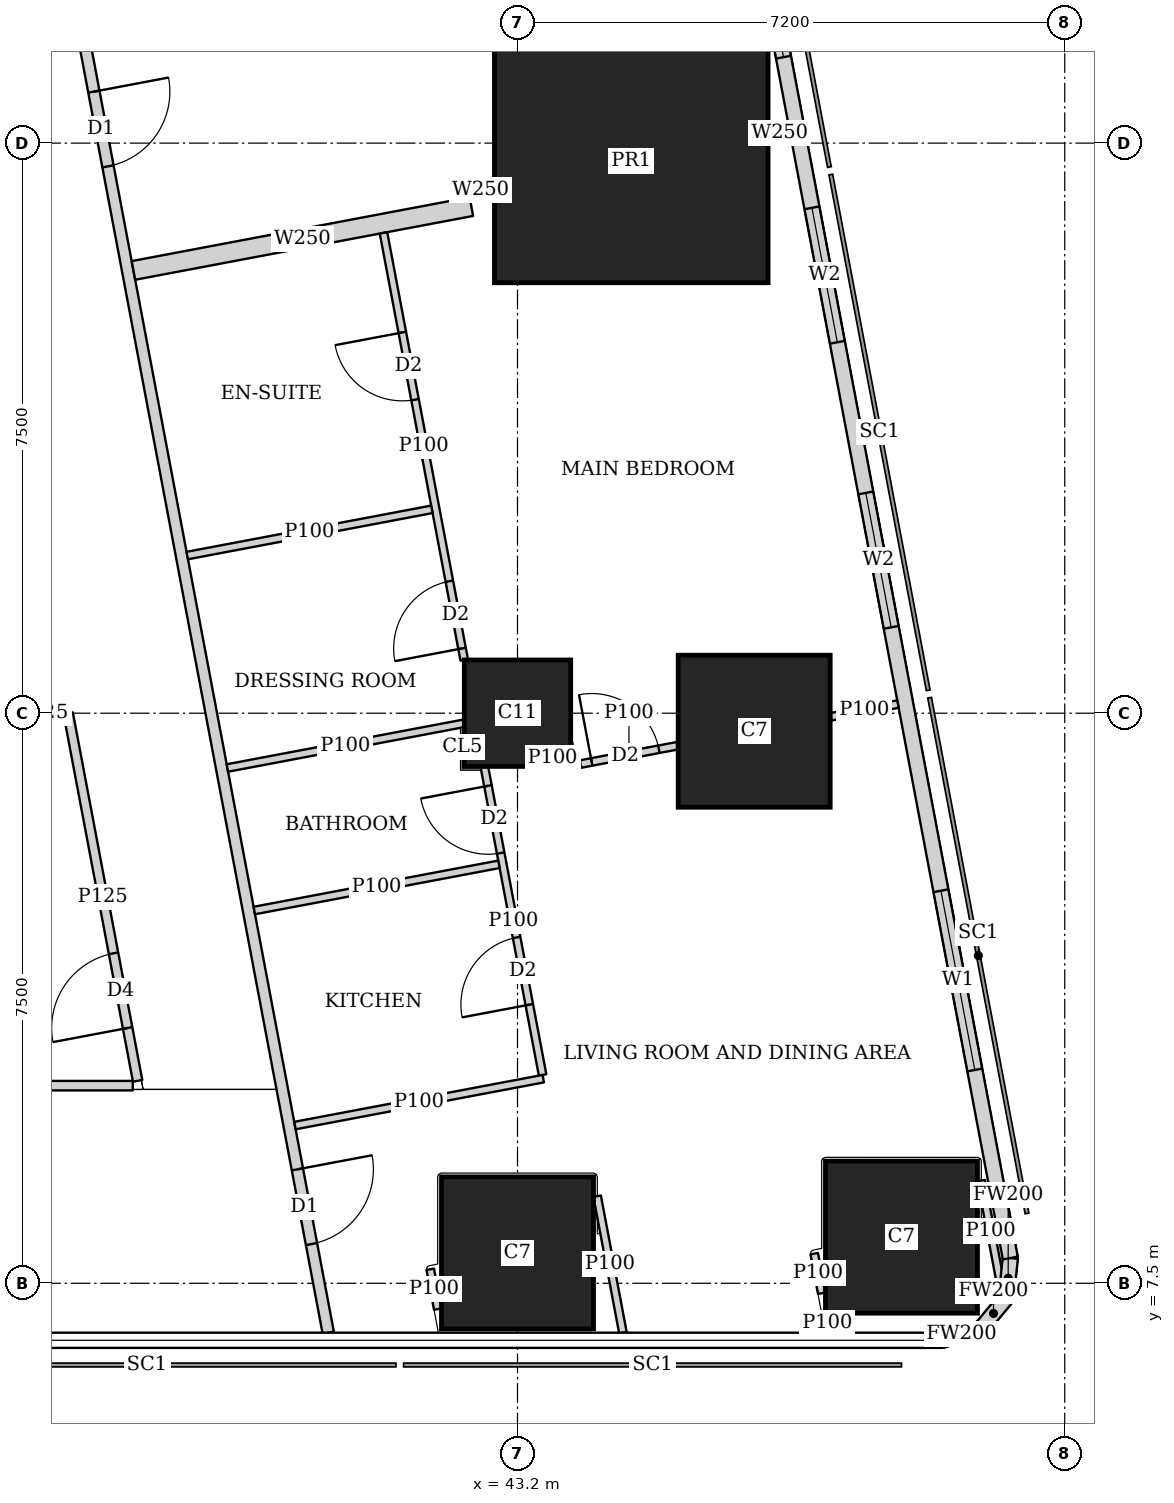
"""IFC4 building model, lengths in metres.
Left out: names, types, materials, properties, quantities, classifications, styles, units other than length and angle.
Written with IfcOpenShell. Run it as: python <this file> out.ifc"""

import sys

from ifc_helpers import new_model, si_unit, direction, frame, frame_2d, origin, origin_2d, place, context, subcontext, project, spatial, rectangle, extrude, element, fill, save


model = new_model("IFC4")
c1 = context("Model", 3, precision=1e-05, world=origin(), true_north=direction((0.0, 1.0)))
c2 = subcontext(c1, "Body", "Model", "MODEL_VIEW")
j1 = project(units=[si_unit("LENGTHUNIT", "METRE"), si_unit("PLANEANGLEUNIT", "RADIAN")], contexts=[c1])
p1 = place(None, origin())
s1 = spatial("IfcSite", under=j1, at=p1, CompositionType="ELEMENT")
p2 = place(p1, origin())
s2 = spatial("IfcBuilding", under=s1, at=p2, CompositionType="ELEMENT")
p3 = place(p2, frame((0.0, 0.0, 289.1)))
s3 = spatial("IfcBuildingStorey", under=s2, at=p3, CompositionType="ELEMENT", Elevation=289.1)
for number, where, z_axis, x_axis in (
    (1, (43.2, 7.9, 0.0), (0.0, 0.0, 1.0), (1.0, 0.0, 0.0)),
    (2, (48.252, 8.107, 0.0), (0.0, 0.0, 1.0), (1.0, 0.0, 0.0)),
):
    element("IfcColumn", number, at=place(p3, frame(where, z_axis=z_axis, x_axis=x_axis)), inside=s3, PredefinedType="COLUMN", context=c2, shape_type="SweptSolid", body=[
        extrude(rectangle(XDim=2.0, YDim=2.0, at=origin_2d()), origin(), (0.0, 0.0, 1.0), 3.75),
    ])
p4 = place(p3, frame((43.2, 15.0, 0.0), z_axis=(0.0, 0.0, 1.0), x_axis=(1.0, 0.0, 0.0)))
e3 = element("IfcColumn", 3, at=p4, inside=s3, PredefinedType="COLUMN", context=c2, shape_type="SweptSolid", body=[
    extrude(rectangle(XDim=1.4, YDim=1.4, at=origin_2d()), origin(), (0.0, 0.0, 1.0), 3.75),
])
p5 = place(p3, frame((46.314, 14.763, 0.0), z_axis=(0.0, 0.0, 1.0), x_axis=(1.0, 0.0, 0.0)))
e4 = element("IfcColumn", 4, at=p5, inside=s3, PredefinedType="COLUMN", context=c2, shape_type="SweptSolid", body=[
    extrude(rectangle(XDim=2.0, YDim=2.0, at=origin_2d()), origin(), (0.0, 0.0, 1.0), 3.75),
])
p6 = place(p3, frame((44.697, 22.263, 0.0), z_axis=(0.0, 0.0, 1.0), x_axis=(1.0, 0.0, 0.0)))
e5 = element("IfcColumn", 5, at=p6, inside=s3, PredefinedType="COLUMN", context=c2, shape_type="SweptSolid", body=[
    extrude(rectangle(XDim=3.6, YDim=3.2, at=origin_2d()), origin(), (0.0, 0.0, 1.0), 3.75),
])
p7 = place(p3, frame((48.787, 6.75, 0.0), z_axis=(0.0, 0.0, 1.0), x_axis=(0.957282247819, 0.289155145225, 0.0)))
e6 = element("IfcWall", 6, at=p7, inside=s3, PredefinedType="SOLIDWALL", context=c2, shape_type="SweptSolid", body=[
    extrude(rectangle(XDim=0.533, YDim=0.2, at=frame_2d((0.266, 0.0))), origin(), (0.0, 0.0, 1.0), 3.5),
])
p8 = place(p3, frame((49.297, 6.904, 0.0), z_axis=(0.0, 0.0, 1.0), x_axis=(0.639255849474, 0.768994121508, 0.0)))
e7 = element("IfcWall", 7, at=p8, inside=s3, PredefinedType="SOLIDWALL", context=c2, shape_type="SweptSolid", body=[
    extrude(rectangle(XDim=0.518, YDim=0.2, at=frame_2d((0.259, 0.0))), origin(), (0.0, 0.0, 1.0), 3.5),
])
p9 = place(p3, frame((49.628, 7.302, 0.0), z_axis=(0.0, 0.0, 1.0), x_axis=(0.105352390132, 0.994434952068, 0.0)))
e8 = element("IfcWall", 8, at=p9, inside=s3, PredefinedType="SOLIDWALL", context=c2, shape_type="SweptSolid", body=[
    extrude(rectangle(XDim=0.533, YDim=0.2, at=frame_2d((0.267, 0.0))), origin(), (0.0, 0.0, 1.0), 3.5),
])
p10 = place(p3, frame((49.684, 7.832, 0.0), z_axis=(0.0, 0.0, 1.0), x_axis=(-0.185616669694, 0.982622232565, 0.0)))
e9 = element("IfcWall", 9, at=p10, inside=s3, PredefinedType="SOLIDWALL", context=c2, shape_type="SweptSolid", body=[
    extrude(rectangle(XDim=36.0, YDim=0.2, at=frame_2d((18.0, 0.0))), origin(), (0.0, 0.0, 1.0), 3.5),
])
p11 = place(p10, frame((2.518, 0.0, 0.9)))
e10 = element("IfcOpeningElement", 10, at=p11, cuts=e9, PredefinedType="OPENING", context=c2, shape_type="SweptSolid", body=[
    extrude(rectangle(XDim=2.4, YDim=1.5, at=frame_2d((1.2, 0.75))), frame((0.0, 0.11, 0.0), z_axis=(0.0, -1.0, 0.0), x_axis=(1.0, 0.0, 0.0)), (0.0, 0.0, 1.0), 0.22),
])
p12 = place(p10, frame((8.444, 0.0, 0.9)))
e11 = element("IfcOpeningElement", 11, at=p12, cuts=e9, PredefinedType="OPENING", context=c2, shape_type="SweptSolid", body=[
    extrude(rectangle(XDim=1.8, YDim=1.5, at=frame_2d((0.9, 0.75))), frame((0.0, 0.11, 0.0), z_axis=(0.0, -1.0, 0.0), x_axis=(1.0, 0.0, 0.0)), (0.0, 0.0, 1.0), 0.22),
])
p13 = place(p10, frame((12.261, 0.0, 0.9)))
e12 = element("IfcOpeningElement", 12, at=p13, cuts=e9, PredefinedType="OPENING", context=c2, shape_type="SweptSolid", body=[
    extrude(rectangle(XDim=1.8, YDim=1.5, at=frame_2d((0.9, 0.75))), frame((0.0, 0.11, 0.0), z_axis=(0.0, -1.0, 0.0), x_axis=(1.0, 0.0, 0.0)), (0.0, 0.0, 1.0), 0.22),
])
p14 = place(p10, frame((16.078, 0.0, 0.9)))
e13 = element("IfcOpeningElement", 13, at=p14, cuts=e9, PredefinedType="OPENING", context=c2, shape_type="SweptSolid", body=[
    extrude(rectangle(XDim=1.8, YDim=1.5, at=frame_2d((0.9, 0.75))), frame((0.0, 0.11, 0.0), z_axis=(0.0, -1.0, 0.0), x_axis=(1.0, 0.0, 0.0)), (0.0, 0.0, 1.0), 0.22),
])
p15 = place(p10, frame((19.894, 0.0, 0.9)))
e14 = element("IfcOpeningElement", 14, at=p15, cuts=e9, PredefinedType="OPENING", context=c2, shape_type="SweptSolid", body=[
    extrude(rectangle(XDim=1.8, YDim=1.5, at=frame_2d((0.9, 0.75))), frame((0.0, 0.11, 0.0), z_axis=(0.0, -1.0, 0.0), x_axis=(1.0, 0.0, 0.0)), (0.0, 0.0, 1.0), 0.22),
])
p16 = place(p10, frame((23.71, 0.0, 0.9)))
e15 = element("IfcOpeningElement", 15, at=p16, cuts=e9, PredefinedType="OPENING", context=c2, shape_type="SweptSolid", body=[
    extrude(rectangle(XDim=1.8, YDim=1.5, at=frame_2d((0.9, 0.75))), frame((0.0, 0.11, 0.0), z_axis=(0.0, -1.0, 0.0), x_axis=(1.0, 0.0, 0.0)), (0.0, 0.0, 1.0), 0.22),
])
p17 = place(p10, frame((27.526, 0.0, 0.9)))
e16 = element("IfcOpeningElement", 16, at=p17, cuts=e9, PredefinedType="OPENING", context=c2, shape_type="SweptSolid", body=[
    extrude(rectangle(XDim=1.8, YDim=1.5, at=frame_2d((0.9, 0.75))), frame((0.0, 0.11, 0.0), z_axis=(0.0, -1.0, 0.0), x_axis=(1.0, 0.0, 0.0)), (0.0, 0.0, 1.0), 0.22),
])
p18 = place(p10, frame((32.046, 0.0, 0.9)))
e17 = element("IfcOpeningElement", 17, at=p18, cuts=e9, PredefinedType="OPENING", context=c2, shape_type="SweptSolid", body=[
    extrude(rectangle(XDim=1.8, YDim=1.5, at=frame_2d((0.9, 0.75))), frame((0.0, 0.11, 0.0), z_axis=(0.0, -1.0, 0.0), x_axis=(1.0, 0.0, 0.0)), (0.0, 0.0, 1.0), 0.22),
])
p19 = place(p3, frame((34.036, 42.186, 0.0), z_axis=(0.0, 0.0, 1.0), x_axis=(0.185593518645, -0.9826266055, 0.0)))
e18 = element("IfcWall", 18, at=p19, inside=s3, PredefinedType="SOLIDWALL", context=c2, shape_type="SweptSolid", body=[
    extrude(rectangle(XDim=35.961, YDim=0.15, at=frame_2d((17.98, 0.0))), origin(), (0.0, 0.0, 1.0), 2.5),
])
p20 = place(p19, frame((19.345, 0.0, 0.0)))
e19 = element("IfcOpeningElement", 19, at=p20, cuts=e18, PredefinedType="OPENING", context=c2, shape_type="SweptSolid", body=[
    extrude(rectangle(XDim=1.0, YDim=2.1, at=frame_2d((0.5, 1.05))), frame((0.0, 0.085, 0.0), z_axis=(0.0, -1.0, 0.0), x_axis=(1.0, 0.0, 0.0)), (0.0, 0.0, 1.0), 0.17),
])
p21 = place(p19, frame((33.774, 0.0, 0.0)))
e20 = element("IfcOpeningElement", 20, at=p21, cuts=e18, PredefinedType="OPENING", context=c2, shape_type="SweptSolid", body=[
    extrude(rectangle(XDim=1.0, YDim=2.1, at=frame_2d((0.5, 1.05))), frame((0.0, 0.085, 0.0), z_axis=(0.0, -1.0, 0.0), x_axis=(1.0, 0.0, 0.0)), (0.0, 0.0, 1.0), 0.17),
])
p22 = place(p3, frame((44.248, 8.646, 0.0), z_axis=(0.0, 0.0, 1.0), x_axis=(0.185417594585, -0.982659816833, 0.0)))
e21 = element("IfcWall", 21, at=p22, inside=s3, PredefinedType="PARTITIONING", context=c2, shape_type="SweptSolid", body=[
    extrude(rectangle(XDim=1.828, YDim=0.1, at=frame_2d((0.914, 0.0))), origin(), (0.0, 0.0, 1.0), 2.05),
])
p23 = place(p3, frame((42.151, 7.16, 0.0), z_axis=(0.0, 0.0, 1.0), x_axis=(-0.185366164644, 0.982669519729, 0.0)))
e22 = element("IfcWall", 22, at=p23, inside=s3, PredefinedType="PARTITIONING", context=c2, shape_type="SweptSolid", body=[
    extrude(rectangle(XDim=0.533, YDim=0.1, at=frame_2d((0.267, 0.0))), origin(), (0.0, 0.0, 1.0), 2.5),
])
p24 = place(p3, frame((49.3, 8.851, 0.0), z_axis=(0.0, 0.0, 1.0), x_axis=(0.18581620423, -0.982584519645, 0.0)))
e23 = element("IfcWall", 23, at=p24, inside=s3, PredefinedType="PARTITIONING", context=c2, shape_type="SweptSolid", body=[
    extrude(rectangle(XDim=1.351, YDim=0.1, at=frame_2d((0.675, 0.0))), origin(), (0.0, 0.0, 1.0), 3.5),
])
p25 = place(p3, frame((47.301, 6.85, 0.0), z_axis=(0.0, 0.0, 1.0), x_axis=(-0.187513903188, 0.982261948826, 0.0)))
e24 = element("IfcWall", 24, at=p25, inside=s3, PredefinedType="PARTITIONING", context=c2, shape_type="SweptSolid", body=[
    extrude(rectangle(XDim=0.251, YDim=0.1, at=frame_2d((0.125, 0.0))), origin(), (0.0, 0.0, 1.0), 3.5),
])
p26 = place(p3, frame((47.203, 7.369, 0.0), z_axis=(0.0, 0.0, 1.0), x_axis=(-0.186456243114, 0.982463266185, 0.0)))
e25 = element("IfcWall", 25, at=p26, inside=s3, PredefinedType="PARTITIONING", context=c2, shape_type="SweptSolid", body=[
    extrude(rectangle(XDim=0.53, YDim=0.1, at=frame_2d((0.265, 0.0))), origin(), (0.0, 0.0, 1.0), 2.05),
])
p27 = place(p3, frame((46.782, 22.657, 0.0), z_axis=(0.0, 0.0, 1.0), x_axis=(-0.982104607121, -0.188336243648, 0.0)))
e26 = element("IfcWall", 26, at=p27, inside=s3, PredefinedType="SOLIDWALL", context=c2, shape_type="SweptSolid", body=[
    extrude(rectangle(XDim=0.266, YDim=0.25, at=frame_2d((0.133, 0.0))), origin(), (0.0, 0.0, 1.0), 3.5),
])
p28 = place(p3, frame((42.873, 21.918, 0.0), z_axis=(0.0, 0.0, 1.0), x_axis=(-0.982431406936, -0.186624035603, 0.0)))
e27 = element("IfcWall", 27, at=p28, inside=s3, PredefinedType="SOLIDWALL", context=c2, shape_type="SweptSolid", body=[
    extrude(rectangle(XDim=0.322, YDim=0.25, at=frame_2d((0.161, 0.0))), origin(), (0.0, 0.0, 1.0), 2.5),
])
p29 = place(p3, frame((42.593, 21.665, 0.0), z_axis=(0.0, 0.0, 1.0), x_axis=(-0.982612837616, -0.185666398014, 0.0)))
e28 = element("IfcWall", 28, at=p29, inside=s3, PredefinedType="SOLIDWALL", context=c2, shape_type="SweptSolid", body=[
    extrude(rectangle(XDim=4.525, YDim=0.25, at=frame_2d((2.262, 0.0))), origin(), (0.0, 0.0, 1.0), 2.5),
])
p30 = place(p3, frame((48.206, 15.12, 0.0), z_axis=(0.0, 0.0, 1.0), x_axis=(-0.982497680814, -0.186274816318, 0.0)))
e29 = element("IfcWall", 29, at=p30, inside=s3, PredefinedType="PARTITIONING", context=c2, shape_type="SweptSolid", body=[
    extrude(rectangle(XDim=0.898, YDim=0.1, at=frame_2d((0.449, 0.0))), origin(), (0.0, 0.0, 1.0), 3.5),
])
p31 = place(p3, frame((45.304, 14.572, 0.0), z_axis=(0.0, 0.0, 1.0), x_axis=(-0.982602741717, -0.185719821156, 0.0)))
e30 = element("IfcWall", 30, at=p31, inside=s3, PredefinedType="PARTITIONING", context=c2, shape_type="SweptSolid", body=[
    extrude(rectangle(XDim=1.297, YDim=0.1, at=frame_2d((0.649, 0.0))), origin(), (0.0, 0.0, 1.0), 3.5),
])
p32 = place(p31, frame((0.248, 0.0, 0.0)))
e31 = element("IfcOpeningElement", 31, at=p32, cuts=e30, PredefinedType="OPENING", context=c2, shape_type="SweptSolid", body=[
    extrude(rectangle(XDim=0.9, YDim=2.1, at=frame_2d((0.45, 1.05))), frame((0.0, 0.06, 0.0), z_axis=(0.0, -1.0, 0.0), x_axis=(1.0, 0.0, 0.0)), (0.0, 0.0, 1.0), 0.12),
])
p33 = place(p3, frame((43.949, 14.485, 0.0), z_axis=(0.0, 0.0, 1.0), x_axis=(0.188651210932, -0.982044154106, 0.0)))
e32 = element("IfcWall", 32, at=p33, inside=s3, PredefinedType="PARTITIONING", context=c2, shape_type="SweptSolid", body=[
    extrude(rectangle(XDim=0.138, YDim=0.1, at=frame_2d((0.069, 0.0))), origin(), (0.0, 0.0, 1.0), 3.5),
])
p34 = place(p3, frame((42.073, 17.682, 0.0), z_axis=(0.0, 0.0, 1.0), x_axis=(-0.982620626894, -0.185625169636, 0.0)))
e33 = element("IfcWall", 33, at=p34, inside=s3, PredefinedType="PARTITIONING", context=c2, shape_type="SweptSolid", body=[
    extrude(rectangle(XDim=3.275, YDim=0.1, at=frame_2d((1.637, 0.0))), origin(), (0.0, 0.0, 1.0), 3.5),
])
p35 = place(p3, frame((42.49, 14.866, 0.0), z_axis=(0.0, 0.0, 1.0), x_axis=(-0.982621285075, -0.185621685472, 0.0)))
e34 = element("IfcWall", 34, at=p35, inside=s3, PredefinedType="PARTITIONING", context=c2, shape_type="SweptSolid", body=[
    extrude(rectangle(XDim=3.162, YDim=0.1, at=frame_2d((1.581, 0.0))), origin(), (0.0, 0.0, 1.0), 3.5),
])
p36 = place(p3, frame((42.956, 13.012, 0.0), z_axis=(0.0, 0.0, 1.0), x_axis=(-0.982630897129, -0.185570795135, 0.0)))
e35 = element("IfcWall", 35, at=p36, inside=s3, PredefinedType="PARTITIONING", context=c2, shape_type="SweptSolid", body=[
    extrude(rectangle(XDim=3.276, YDim=0.1, at=frame_2d((1.638, 0.0))), origin(), (0.0, 0.0, 1.0), 3.5),
])
p37 = place(p3, frame((43.539, 10.192, 0.0), z_axis=(0.0, 0.0, 1.0), x_axis=(-0.982633623707, -0.185556356831, 0.0)))
e36 = element("IfcWall", 36, at=p37, inside=s3, PredefinedType="PARTITIONING", context=c2, shape_type="SweptSolid", body=[
    extrude(rectangle(XDim=3.325, YDim=0.1, at=frame_2d((1.663, 0.0))), origin(), (0.0, 0.0, 1.0), 3.5),
])
p38 = place(p3, frame((41.437, 21.319, 0.0), z_axis=(0.0, 0.0, 1.0), x_axis=(0.185742368638, -0.982598479794, 0.0)))
e37 = element("IfcWall", 37, at=p38, inside=s3, PredefinedType="PARTITIONING", context=c2, shape_type="SweptSolid", body=[
    extrude(rectangle(XDim=5.718, YDim=0.1, at=frame_2d((2.859, 0.0))), origin(), (0.0, 0.0, 1.0), 3.5),
])
p39 = place(p38, frame((1.333, 0.0, 0.0)))
e38 = element("IfcOpeningElement", 38, at=p39, cuts=e37, PredefinedType="OPENING", context=c2, shape_type="SweptSolid", body=[
    extrude(rectangle(XDim=0.9, YDim=2.1, at=frame_2d((0.45, 1.05))), frame((0.0, 0.06, 0.0), z_axis=(0.0, -1.0, 0.0), x_axis=(1.0, 0.0, 0.0)), (0.0, 0.0, 1.0), 0.12),
])
p40 = place(p38, frame((4.664, 0.0, 0.0)))
e39 = element("IfcOpeningElement", 39, at=p40, cuts=e37, PredefinedType="OPENING", context=c2, shape_type="SweptSolid", body=[
    extrude(rectangle(XDim=0.9, YDim=2.1, at=frame_2d((0.45, 1.05))), frame((0.0, 0.06, 0.0), z_axis=(0.0, -1.0, 0.0), x_axis=(1.0, 0.0, 0.0)), (0.0, 0.0, 1.0), 0.12),
])
p41 = place(p3, frame((42.765, 14.29, 0.0), z_axis=(0.0, 0.0, 1.0), x_axis=(0.185679870644, -0.982610291844, 0.0)))
e40 = element("IfcWall", 40, at=p41, inside=s3, PredefinedType="PARTITIONING", context=c2, shape_type="SweptSolid", body=[
    extrude(rectangle(XDim=4.121, YDim=0.1, at=frame_2d((2.061, 0.0))), origin(), (0.0, 0.0, 1.0), 3.5),
])
p42 = place(p41, frame((0.25, 0.0, 0.0)))
e41 = element("IfcOpeningElement", 41, at=p42, cuts=e40, PredefinedType="OPENING", context=c2, shape_type="SweptSolid", body=[
    extrude(rectangle(XDim=0.9, YDim=2.1, at=frame_2d((0.45, 1.05))), frame((0.0, 0.06, 0.0), z_axis=(0.0, -1.0, 0.0), x_axis=(1.0, 0.0, 0.0)), (0.0, 0.0, 1.0), 0.12),
])
p43 = place(p41, frame((2.28, 0.0, 0.0)))
e42 = element("IfcOpeningElement", 42, at=p43, cuts=e40, PredefinedType="OPENING", context=c2, shape_type="SweptSolid", body=[
    extrude(rectangle(XDim=0.9, YDim=2.1, at=frame_2d((0.45, 1.05))), frame((0.0, 0.06, 0.0), z_axis=(0.0, -1.0, 0.0), x_axis=(1.0, 0.0, 0.0)), (0.0, 0.0, 1.0), 0.12),
])
p44 = place(p3, frame((28.95, 10.1, 0.0), z_axis=(0.0, 0.0, 1.0), x_axis=(1.0, 0.0, 0.0)))
e43 = element("IfcWall", 43, at=p44, inside=s3, PredefinedType="PARTITIONING", context=c2, shape_type="SweptSolid", body=[
    extrude(rectangle(XDim=9.188, YDim=0.125, at=frame_2d((4.594, 0.0))), origin(), (0.0, 0.0, 1.0), 3.5),
])
p45 = place(p3, frame((38.202, 10.163, 0.0), z_axis=(0.0, 0.0, 1.0), x_axis=(-0.185641892853, 0.982617467593, 0.0)))
e44 = element("IfcWall", 44, at=p45, inside=s3, PredefinedType="PARTITIONING", context=c2, shape_type="SweptSolid", body=[
    extrude(rectangle(XDim=4.922, YDim=0.125, at=frame_2d((2.461, 0.0))), origin(), (0.0, 0.0, 1.0), 3.5),
])
p46 = place(p45, frame((0.708, 0.0, 0.0)))
e45 = element("IfcOpeningElement", 45, at=p46, cuts=e44, PredefinedType="OPENING", context=c2, shape_type="SweptSolid", body=[
    extrude(rectangle(XDim=1.0, YDim=2.1, at=frame_2d((0.5, 1.05))), frame((0.0, 0.073, 0.0), z_axis=(0.0, -1.0, 0.0), x_axis=(1.0, 0.0, 0.0)), (0.0, 0.0, 1.0), 0.145),
])
p47 = place(p3, frame((36.701, 15.0, 0.0), z_axis=(0.0, 0.0, 1.0), x_axis=(1.0, 0.0, 0.0)))
e46 = element("IfcWall", 46, at=p47, inside=s3, PredefinedType="PARTITIONING", context=c2, shape_type="SweptSolid", body=[
    extrude(rectangle(XDim=0.526, YDim=0.125, at=frame_2d((0.263, 0.0))), origin(), (0.0, 0.0, 1.0), 3.5),
])
p48 = place(p11, origin())
e47 = element("IfcWindow", 47, at=p48, inside=s3, PartitioningType="SINGLE_PANEL", PredefinedType="WINDOW", context=c2, shape_type="SweptSolid", body=[
    extrude(rectangle(XDim=2.4, YDim=1.5, at=frame_2d((1.2, 0.75))), frame((0.0, 0.03, 0.0), z_axis=(0.0, -1.0, 0.0), x_axis=(1.0, 0.0, 0.0)), (0.0, 0.0, 1.0), 0.06),
])
fill(e10, e47)
p49 = place(p12, origin())
e48 = element("IfcWindow", 48, at=p49, inside=s3, PartitioningType="SINGLE_PANEL", PredefinedType="WINDOW", context=c2, shape_type="SweptSolid", body=[
    extrude(rectangle(XDim=1.8, YDim=1.5, at=frame_2d((0.9, 0.75))), frame((0.0, 0.03, 0.0), z_axis=(0.0, -1.0, 0.0), x_axis=(1.0, 0.0, 0.0)), (0.0, 0.0, 1.0), 0.06),
])
fill(e11, e48)
p50 = place(p13, origin())
e49 = element("IfcWindow", 49, at=p50, inside=s3, PartitioningType="SINGLE_PANEL", PredefinedType="WINDOW", context=c2, shape_type="SweptSolid", body=[
    extrude(rectangle(XDim=1.8, YDim=1.5, at=frame_2d((0.9, 0.75))), frame((0.0, 0.03, 0.0), z_axis=(0.0, -1.0, 0.0), x_axis=(1.0, 0.0, 0.0)), (0.0, 0.0, 1.0), 0.06),
])
fill(e12, e49)
p51 = place(p14, origin())
e50 = element("IfcWindow", 50, at=p51, inside=s3, PartitioningType="SINGLE_PANEL", PredefinedType="WINDOW", context=c2, shape_type="SweptSolid", body=[
    extrude(rectangle(XDim=1.8, YDim=1.5, at=frame_2d((0.9, 0.75))), frame((0.0, 0.03, 0.0), z_axis=(0.0, -1.0, 0.0), x_axis=(1.0, 0.0, 0.0)), (0.0, 0.0, 1.0), 0.06),
])
fill(e13, e50)
p52 = place(p20, origin())
e51 = element("IfcDoor", 51, at=p52, inside=s3, OperationType="SINGLE_SWING_LEFT", PredefinedType="DOOR", context=c2, shape_type="SweptSolid", body=[
    extrude(rectangle(XDim=1.0, YDim=2.1, at=frame_2d((0.5, 1.05))), frame((0.0, 0.025, 0.0), z_axis=(0.0, -1.0, 0.0), x_axis=(1.0, 0.0, 0.0)), (0.0, 0.0, 1.0), 0.05),
])
fill(e19, e51)
p53 = place(p32, origin())
e52 = element("IfcDoor", 52, at=p53, inside=s3, OperationType="SINGLE_SWING_LEFT", PredefinedType="DOOR", context=c2, shape_type="SweptSolid", body=[
    extrude(rectangle(XDim=0.9, YDim=2.1, at=frame_2d((0.45, 1.05))), frame((0.0, 0.025, 0.0), z_axis=(0.0, -1.0, 0.0), x_axis=(1.0, 0.0, 0.0)), (0.0, 0.0, 1.0), 0.05),
])
fill(e31, e52)
p54 = place(p39, origin())
e53 = element("IfcDoor", 53, at=p54, inside=s3, OperationType="SINGLE_SWING_RIGHT", PredefinedType="DOOR", context=c2, shape_type="SweptSolid", body=[
    extrude(rectangle(XDim=0.9, YDim=2.1, at=frame_2d((0.45, 1.05))), frame((0.0, 0.025, 0.0), z_axis=(0.0, -1.0, 0.0), x_axis=(1.0, 0.0, 0.0)), (0.0, 0.0, 1.0), 0.05),
])
fill(e38, e53)
p55 = place(p40, origin())
e54 = element("IfcDoor", 54, at=p55, inside=s3, OperationType="SINGLE_SWING_LEFT", PredefinedType="DOOR", context=c2, shape_type="SweptSolid", body=[
    extrude(rectangle(XDim=0.9, YDim=2.1, at=frame_2d((0.45, 1.05))), frame((0.0, 0.025, 0.0), z_axis=(0.0, -1.0, 0.0), x_axis=(1.0, 0.0, 0.0)), (0.0, 0.0, 1.0), 0.05),
])
fill(e39, e54)
p56 = place(p42, origin())
e55 = element("IfcDoor", 55, at=p56, inside=s3, OperationType="SINGLE_SWING_RIGHT", PredefinedType="DOOR", context=c2, shape_type="SweptSolid", body=[
    extrude(rectangle(XDim=0.9, YDim=2.1, at=frame_2d((0.45, 1.05))), frame((0.0, 0.025, 0.0), z_axis=(0.0, -1.0, 0.0), x_axis=(1.0, 0.0, 0.0)), (0.0, 0.0, 1.0), 0.05),
])
fill(e41, e55)
p57 = place(p43, origin())
e56 = element("IfcDoor", 56, at=p57, inside=s3, OperationType="SINGLE_SWING_LEFT", PredefinedType="DOOR", context=c2, shape_type="SweptSolid", body=[
    extrude(rectangle(XDim=0.9, YDim=2.1, at=frame_2d((0.45, 1.05))), frame((0.0, 0.025, 0.0), z_axis=(0.0, -1.0, 0.0), x_axis=(1.0, 0.0, 0.0)), (0.0, 0.0, 1.0), 0.05),
])
fill(e42, e56)
p58 = place(p21, origin())
e57 = element("IfcDoor", 57, at=p58, inside=s3, OperationType="SINGLE_SWING_LEFT", PredefinedType="DOOR", context=c2, shape_type="SweptSolid", body=[
    extrude(rectangle(XDim=1.0, YDim=2.1, at=frame_2d((0.5, 1.05))), frame((0.0, 0.025, 0.0), z_axis=(0.0, -1.0, 0.0), x_axis=(1.0, 0.0, 0.0)), (0.0, 0.0, 1.0), 0.05),
])
fill(e20, e57)
p59 = place(p46, origin())
e58 = element("IfcDoor", 58, at=p59, inside=s3, OperationType="SINGLE_SWING_LEFT", PredefinedType="DOOR", context=c2, shape_type="SweptSolid", body=[
    extrude(rectangle(XDim=1.0, YDim=2.1, at=frame_2d((0.5, 1.05))), frame((0.0, 0.025, 0.0), z_axis=(0.0, -1.0, 0.0), x_axis=(1.0, 0.0, 0.0)), (0.0, 0.0, 1.0), 0.05),
])
fill(e45, e58)
save(model, sys.argv[1])
